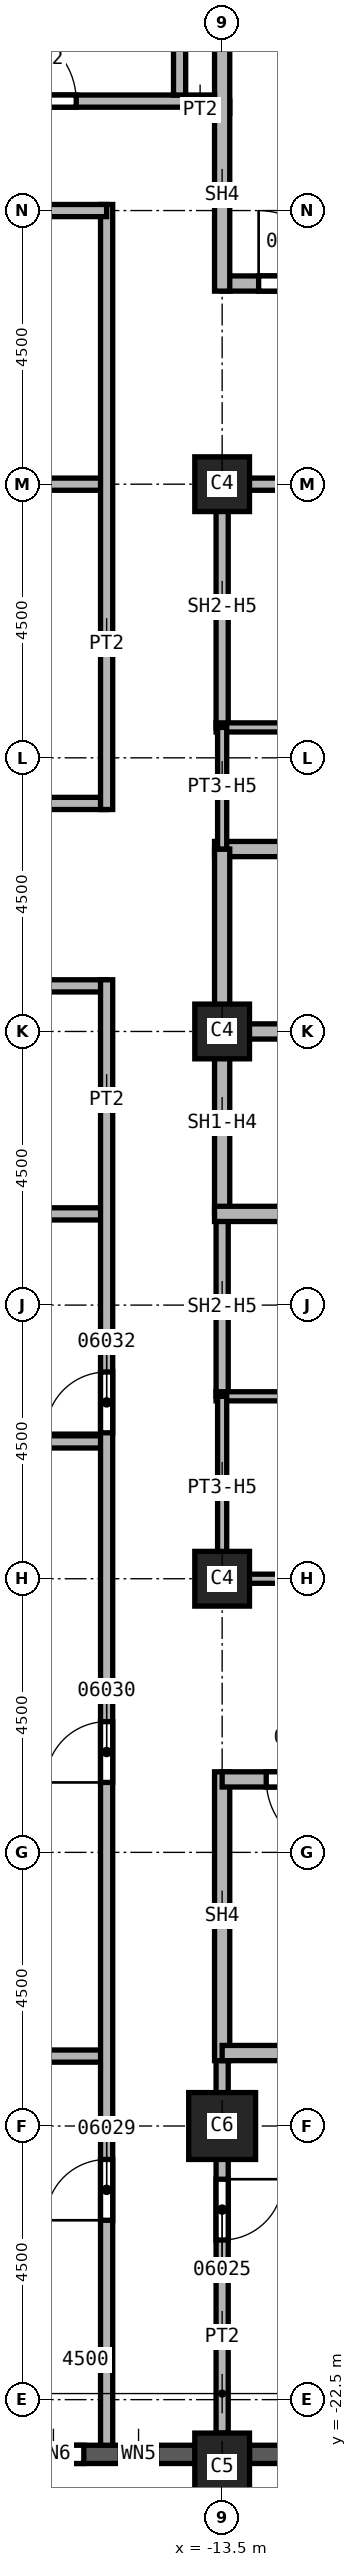
"""IFC4 building model, lengths in metres.
Left out: names, types, materials, properties, quantities, classifications, styles, units other than length and angle.
Written with IfcOpenShell. Run it as: python <this file> out.ifc"""

import sys

from ifc_helpers import new_model, si_unit, direction, frame, frame_2d, origin, origin_2d, place, context, subcontext, project, spatial, rectangle, extrude, element, fill, save


model = new_model("IFC4")
c1 = context("Model", 3, precision=1e-05, world=origin(), true_north=direction((0.0, 1.0)))
c2 = subcontext(c1, "Body", "Model", "MODEL_VIEW")
j1 = project(units=[si_unit("LENGTHUNIT", "METRE"), si_unit("PLANEANGLEUNIT", "RADIAN")], contexts=[c1])
p1 = place(None, origin())
s1 = spatial("IfcSite", under=j1, at=p1, CompositionType="ELEMENT")
p2 = place(p1, origin())
s2 = spatial("IfcBuilding", under=s1, at=p2, CompositionType="ELEMENT")
p3 = place(p2, frame((0.0, 0.0, 130.0)))
s3 = spatial("IfcBuildingStorey", under=s2, at=p3, CompositionType="ELEMENT", Elevation=130.0)
p4 = place(p3, frame((-13.5, -18.0, 0.0), z_axis=(0.0, 0.0, 1.0), x_axis=(1.0, 0.0, 0.0)))
e1 = element("IfcColumn", 1, at=p4, inside=s3, PredefinedType="COLUMN", context=c2, shape_type="SweptSolid", body=[
    extrude(rectangle(XDim=1.1, YDim=1.1, at=origin_2d()), origin(), (0.0, 0.0, 1.0), 3.7),
])
for number, where, z_axis, x_axis in (
    (2, (-13.5, 0.0, 0.0), (0.0, 0.0, 1.0), (1.0, 0.0, 0.0)),
    (3, (-13.5, 9.0, 0.0), (0.0, 0.0, 1.0), (1.0, 0.0, 0.0)),
    (4, (-13.5, -9.0, 0.0), (0.0, 0.0, 1.0), (1.0, 0.0, 0.0)),
):
    element("IfcColumn", number, at=place(p3, frame(where, z_axis=z_axis, x_axis=x_axis)), inside=s3, PredefinedType="COLUMN", context=c2, shape_type="SweptSolid", body=[
        extrude(rectangle(XDim=0.9, YDim=0.9, at=origin_2d()), origin(), (0.0, 0.0, 1.0), 3.7),
    ])
p5 = place(p3, frame((-13.5, -23.6, 0.0), z_axis=(0.0, 0.0, 1.0), x_axis=(1.0, 0.0, 0.0)))
e5 = element("IfcColumn", 5, at=p5, inside=s3, PredefinedType="COLUMN", context=c2, shape_type="SweptSolid", body=[
    extrude(rectangle(XDim=0.9, YDim=1.1, at=origin_2d()), origin(), (0.0, 0.0, 1.0), 3.7),
])
p6 = place(p3, frame((-17.55, -23.4, 0.0), z_axis=(0.0, 0.0, 1.0), x_axis=(1.0, 0.0, 0.0)))
e6 = element("IfcWall", 6, at=p6, inside=s3, PredefinedType="SOLIDWALL", context=c2, shape_type="SweptSolid", body=[
    extrude(rectangle(XDim=3.6, YDim=0.3, at=frame_2d((1.8, 0.0))), origin(), (0.0, 0.0, 1.0), 3.1),
])
p7 = place(p6, frame((0.775, 0.0, 0.8)))
e7 = element("IfcOpeningElement", 7, at=p7, cuts=e6, PredefinedType="OPENING", context=c2, shape_type="SweptSolid", body=[
    extrude(rectangle(XDim=1.0, YDim=1.95, at=frame_2d((0.5, 0.975))), frame((0.0, 0.15, 0.0), z_axis=(0.0, -1.0, 0.0), x_axis=(1.0, 0.0, 0.0)), (0.0, 0.0, 1.0), 0.3),
])
p8 = place(p6, frame((2.375, 0.0, 0.8)))
e8 = element("IfcOpeningElement", 8, at=p8, cuts=e6, PredefinedType="OPENING", context=c2, shape_type="SweptSolid", body=[
    extrude(rectangle(XDim=0.6, YDim=1.95, at=frame_2d((0.3, 0.975))), frame((0.0, 0.15, 0.0), z_axis=(0.0, -1.0, 0.0), x_axis=(1.0, 0.0, 0.0)), (0.0, 0.0, 1.0), 0.3),
])
p9 = place(p3, frame((-13.05, -23.4, 0.0), z_axis=(0.0, 0.0, 1.0), x_axis=(1.0, 0.0, 0.0)))
e9 = element("IfcWall", 9, at=p9, inside=s3, PredefinedType="SOLIDWALL", context=c2, shape_type="SweptSolid", body=[
    extrude(rectangle(XDim=3.6, YDim=0.3, at=frame_2d((1.8, 0.0))), origin(), (0.0, 0.0, 1.0), 3.1),
])
p10 = place(p9, frame((0.6, 0.0, 0.8)))
e10 = element("IfcOpeningElement", 10, at=p10, cuts=e9, PredefinedType="OPENING", context=c2, shape_type="SweptSolid", body=[
    extrude(rectangle(XDim=2.4, YDim=1.95, at=frame_2d((1.2, 0.975))), frame((0.0, 0.15, 0.0), z_axis=(0.0, -1.0, 0.0), x_axis=(1.0, 0.0, 0.0)), (0.0, 0.0, 1.0), 0.3),
])
p11 = place(p3, frame((-33.85, 3.75, 0.0), z_axis=(0.0, 0.0, 1.0), x_axis=(1.0, 0.0, 0.0)))
e11 = element("IfcWall", 11, at=p11, inside=s3, PredefinedType="PARTITIONING", context=c2, shape_type="SweptSolid", body=[
    extrude(rectangle(XDim=18.45, YDim=0.2, at=frame_2d((9.225, 0.0))), origin(), (0.0, 0.0, 1.0), 3.7),
])
p12 = place(p11, frame((14.8, 0.0, 0.0)))
e12 = element("IfcOpeningElement", 12, at=p12, cuts=e11, PredefinedType="OPENING", context=c2, shape_type="SweptSolid", body=[
    extrude(rectangle(XDim=1.0, YDim=2.1, at=frame_2d((0.5, 1.05))), frame((0.0, 0.1, 0.0), z_axis=(0.0, -1.0, 0.0), x_axis=(1.0, 0.0, 0.0)), (0.0, 0.0, 1.0), 0.2),
])
p13 = place(p3, frame((-15.4, 0.75, 0.0), z_axis=(0.0, 0.0, 1.0), x_axis=(-1.0, 0.0, 0.0)))
e13 = element("IfcWall", 13, at=p13, inside=s3, PredefinedType="PARTITIONING", context=c2, shape_type="SweptSolid", body=[
    extrude(rectangle(XDim=18.45, YDim=0.2, at=frame_2d((9.225, 0.0))), origin(), (0.0, 0.0, 1.0), 3.7),
])
p14 = place(p13, frame((2.65, 0.0, 0.0)))
e14 = element("IfcOpeningElement", 14, at=p14, cuts=e13, PredefinedType="OPENING", context=c2, shape_type="SweptSolid", body=[
    extrude(rectangle(XDim=1.0, YDim=2.1, at=frame_2d((0.5, 1.05))), frame((0.0, 0.1, 0.0), z_axis=(0.0, -1.0, 0.0), x_axis=(1.0, 0.0, 0.0)), (0.0, 0.0, 1.0), 0.2),
])
p15 = place(p13, frame((12.5, 0.0, 0.0)))
e15 = element("IfcOpeningElement", 15, at=p15, cuts=e13, PredefinedType="OPENING", context=c2, shape_type="SweptSolid", body=[
    extrude(rectangle(XDim=1.0, YDim=2.1, at=frame_2d((0.5, 1.05))), frame((0.0, 0.1, 0.0), z_axis=(0.0, -1.0, 0.0), x_axis=(1.0, 0.0, 0.0)), (0.0, 0.0, 1.0), 0.2),
])
for number, where, z_axis, x_axis in (
    (16, (-27.1, -6.75, 0.0), (0.0, 0.0, 1.0), (1.0, 0.0, 0.0)),
    (17, (-27.1, -3.0, 0.0), (0.0, 0.0, 1.0), (1.0, 0.0, 0.0)),
    (18, (-27.1, 9.0, 0.0), (0.0, 0.0, 1.0), (1.0, 0.0, 0.0)),
):
    element("IfcWall", number, at=place(p3, frame(where, z_axis=z_axis, x_axis=x_axis)), inside=s3, PredefinedType="PARTITIONING", context=c2, shape_type="SweptSolid", body=[
        extrude(rectangle(XDim=11.7, YDim=0.2, at=frame_2d((5.85, 0.0))), origin(), (0.0, 0.0, 1.0), 3.7),
    ])
p16 = place(p3, frame((-20.0, -16.85, 0.0), z_axis=(0.0, 0.0, 1.0), x_axis=(1.0, 0.0, 0.0)))
e19 = element("IfcWall", 19, at=p16, inside=s3, PredefinedType="PARTITIONING", context=c2, shape_type="SweptSolid", body=[
    extrude(rectangle(XDim=4.6, YDim=0.2, at=frame_2d((2.3, 0.0))), origin(), (0.0, 0.0, 1.0), 3.7),
])
p17 = place(p3, frame((-15.4, -23.25, 0.0), z_axis=(0.0, 0.0, 1.0), x_axis=(0.0, 1.0, 0.0)))
e20 = element("IfcWall", 20, at=p17, inside=s3, PredefinedType="PARTITIONING", context=c2, shape_type="SweptSolid", body=[
    extrude(rectangle(XDim=24.1, YDim=0.2, at=frame_2d((12.05, 0.0))), origin(), (0.0, 0.0, 1.0), 3.7),
])
p18 = place(p17, frame((3.7, 0.0, 0.0)))
e21 = element("IfcOpeningElement", 21, at=p18, cuts=e20, PredefinedType="OPENING", context=c2, shape_type="SweptSolid", body=[
    extrude(rectangle(XDim=1.0, YDim=2.1, at=frame_2d((0.5, 1.05))), frame((0.0, 0.1, 0.0), z_axis=(0.0, -1.0, 0.0), x_axis=(1.0, 0.0, 0.0)), (0.0, 0.0, 1.0), 0.2),
])
p19 = place(p17, frame((10.9, 0.0, 0.0)))
e22 = element("IfcOpeningElement", 22, at=p19, cuts=e20, PredefinedType="OPENING", context=c2, shape_type="SweptSolid", body=[
    extrude(rectangle(XDim=1.0, YDim=2.1, at=frame_2d((0.5, 1.05))), frame((0.0, 0.1, 0.0), z_axis=(0.0, -1.0, 0.0), x_axis=(1.0, 0.0, 0.0)), (0.0, 0.0, 1.0), 0.2),
])
p20 = place(p17, frame((16.65, 0.0, 0.0)))
e23 = element("IfcOpeningElement", 23, at=p20, cuts=e20, PredefinedType="OPENING", context=c2, shape_type="SweptSolid", body=[
    extrude(rectangle(XDim=1.0, YDim=2.1, at=frame_2d((0.5, 1.05))), frame((0.0, 0.1, 0.0), z_axis=(0.0, -1.0, 0.0), x_axis=(1.0, 0.0, 0.0)), (0.0, 0.0, 1.0), 0.2),
])
p21 = place(p3, frame((-15.4, 3.65, 0.0), z_axis=(0.0, 0.0, 1.0), x_axis=(0.0, 1.0, 0.0)))
e24 = element("IfcWall", 24, at=p21, inside=s3, PredefinedType="PARTITIONING", context=c2, shape_type="SweptSolid", body=[
    extrude(rectangle(XDim=9.95, YDim=0.2, at=frame_2d((4.975, 0.0))), origin(), (0.0, 0.0, 1.0), 3.7),
])
p22 = place(p3, frame((-15.4, 13.5, 0.0), z_axis=(0.0, 0.0, 1.0), x_axis=(-1.0, 0.0, 0.0)))
e25 = element("IfcWall", 25, at=p22, inside=s3, PredefinedType="PARTITIONING", context=c2, shape_type="SweptSolid", body=[
    extrude(rectangle(XDim=6.6, YDim=0.2, at=frame_2d((3.3, 0.0))), origin(), (0.0, 0.0, 1.0), 3.7),
])
p23 = place(p22, frame((4.6, 0.0, 0.0)))
e26 = element("IfcOpeningElement", 26, at=p23, cuts=e25, PredefinedType="OPENING", context=c2, shape_type="SweptSolid", body=[
    extrude(rectangle(XDim=1.0, YDim=2.1, at=frame_2d((0.5, 1.05))), frame((0.0, 0.1, 0.0), z_axis=(0.0, -1.0, 0.0), x_axis=(1.0, 0.0, 0.0)), (0.0, 0.0, 1.0), 0.2),
])
p24 = place(p3, frame((-14.1, 15.2, 0.0), z_axis=(0.0, 0.0, 1.0), x_axis=(1.0, 0.0, 0.0)))
e27 = element("IfcWall", 27, at=p24, inside=s3, PredefinedType="PARTITIONING", context=c2, shape_type="SweptSolid", body=[
    extrude(rectangle(XDim=0.725, YDim=0.2, at=frame_2d((0.363, 0.0))), origin(), (0.0, 0.0, 1.0), 3.7),
])
p25 = place(p3, frame((-13.5, -16.675, 0.0), z_axis=(0.0, 0.0, 1.0), x_axis=(0.0, -1.0, 0.0)))
e28 = element("IfcWall", 28, at=p25, inside=s3, PredefinedType="PARTITIONING", context=c2, shape_type="SweptSolid", body=[
    extrude(rectangle(XDim=6.375, YDim=0.2, at=frame_2d((3.188, 0.0))), origin(), (0.0, 0.0, 1.0), 3.7),
])
p26 = place(p25, frame((2.2, 0.0, 0.0)))
e29 = element("IfcOpeningElement", 29, at=p26, cuts=e28, PredefinedType="OPENING", context=c2, shape_type="SweptSolid", body=[
    extrude(rectangle(XDim=1.0, YDim=2.1, at=frame_2d((0.5, 1.05))), frame((0.0, 0.1, 0.0), z_axis=(0.0, -1.0, 0.0), x_axis=(1.0, 0.0, 0.0)), (0.0, 0.0, 1.0), 0.2),
])
p27 = place(p3, frame((-13.5, -6.0, 0.0), z_axis=(0.0, 0.0, 1.0), x_axis=(0.0, 1.0, 0.0)))
e30 = element("IfcWall", 30, at=p27, inside=s3, PredefinedType="SOLIDWALL", context=c2, shape_type="SweptSolid", body=[
    extrude(rectangle(XDim=3.0, YDim=0.2, at=frame_2d((1.5, 0.0))), origin(), (0.0, 0.0, 1.0), 2.938),
])
p28 = place(p3, frame((-13.5, 5.0, 0.0), z_axis=(0.0, 0.0, 1.0), x_axis=(0.0, 1.0, 0.0)))
e31 = element("IfcWall", 31, at=p28, inside=s3, PredefinedType="SOLIDWALL", context=c2, shape_type="SweptSolid", body=[
    extrude(rectangle(XDim=4.1, YDim=0.2, at=frame_2d((2.05, 0.0))), origin(), (0.0, 0.0, 1.0), 2.938),
])
p29 = place(p3, frame((-13.5, 9.0, 0.0), z_axis=(0.0, 0.0, 1.0), x_axis=(1.0, 0.0, 0.0)))
e32 = element("IfcWall", 32, at=p29, inside=s3, PredefinedType="SOLIDWALL", context=c2, shape_type="SweptSolid", body=[
    extrude(rectangle(XDim=3.0, YDim=0.2, at=frame_2d((1.5, 0.0))), origin(), (0.0, 0.0, 1.0), 2.938),
])
p30 = place(p3, frame((-13.625, 0.0, 0.0), z_axis=(0.0, 0.0, 1.0), x_axis=(1.0, 0.0, 0.0)))
e33 = element("IfcWall", 33, at=p30, inside=s3, PredefinedType="SOLIDWALL", context=c2, shape_type="SweptSolid", body=[
    extrude(rectangle(XDim=3.125, YDim=0.25, at=frame_2d((1.562, 0.0))), origin(), (0.0, 0.0, 1.0), 3.7),
])
p31 = place(p3, frame((-13.625, 3.0, 0.0), z_axis=(0.0, 0.0, 1.0), x_axis=(1.0, 0.0, 0.0)))
e34 = element("IfcWall", 34, at=p31, inside=s3, PredefinedType="SOLIDWALL", context=c2, shape_type="SweptSolid", body=[
    extrude(rectangle(XDim=6.125, YDim=0.25, at=frame_2d((3.062, 0.0))), origin(), (0.0, 0.0, 1.0), 3.7),
])
p32 = place(p31, frame((3.25, 0.0, 0.0)))
e35 = element("IfcOpeningElement", 35, at=p32, cuts=e34, PredefinedType="OPENING", context=c2, shape_type="SweptSolid", body=[
    extrude(rectangle(XDim=1.1, YDim=2.1, at=frame_2d((0.55, 1.05))), frame((0.0, 0.125, 0.0), z_axis=(0.0, -1.0, 0.0), x_axis=(1.0, 0.0, 0.0)), (0.0, 0.0, 1.0), 0.25),
])
p33 = place(p3, frame((-13.5, -3.0, 0.0), z_axis=(0.0, 0.0, 1.0), x_axis=(0.0, 1.0, 0.0)))
e36 = element("IfcWall", 36, at=p33, inside=s3, PredefinedType="SOLIDWALL", context=c2, shape_type="SweptSolid", body=[
    extrude(rectangle(XDim=6.0, YDim=0.25, at=frame_2d((3.0, 0.0))), origin(), (0.0, 0.0, 1.0), 2.938),
])
p34 = place(p3, frame((-13.625, -3.0, 0.0), z_axis=(0.0, 0.0, 1.0), x_axis=(1.0, 0.0, 0.0)))
e37 = element("IfcWall", 37, at=p34, inside=s3, PredefinedType="SOLIDWALL", context=c2, shape_type="SweptSolid", body=[
    extrude(rectangle(XDim=9.25, YDim=0.25, at=frame_2d((4.625, 0.0))), origin(), (0.0, 0.0, 1.0), 3.7),
])
p35 = place(p34, frame((3.25, 0.0, 0.0)))
e38 = element("IfcOpeningElement", 38, at=p35, cuts=e37, PredefinedType="OPENING", context=c2, shape_type="SweptSolid", body=[
    extrude(rectangle(XDim=1.1, YDim=2.1, at=frame_2d((0.55, 1.05))), frame((0.0, 0.125, 0.0), z_axis=(0.0, -1.0, 0.0), x_axis=(1.0, 0.0, 0.0)), (0.0, 0.0, 1.0), 0.25),
])
p36 = place(p3, frame((-13.5, -12.175, 0.0), z_axis=(0.0, 0.0, 1.0), x_axis=(0.0, -1.0, 0.0)))
e39 = element("IfcWall", 39, at=p36, inside=s3, PredefinedType="SOLIDWALL", context=c2, shape_type="SweptSolid", body=[
    extrude(rectangle(XDim=4.75, YDim=0.25, at=frame_2d((2.375, 0.0))), origin(), (0.0, 0.0, 1.0), 3.7),
])
p37 = place(p3, frame((-13.5, 12.3, 0.0), z_axis=(0.0, 0.0, 1.0), x_axis=(1.0, 0.0, 0.0)))
e40 = element("IfcWall", 40, at=p37, inside=s3, PredefinedType="SOLIDWALL", context=c2, shape_type="SweptSolid", body=[
    extrude(rectangle(XDim=9.125, YDim=0.25, at=frame_2d((4.562, 0.0))), origin(), (0.0, 0.0, 1.0), 3.7),
])
p38 = place(p37, frame((0.6, 0.0, 0.0)))
e41 = element("IfcOpeningElement", 41, at=p38, cuts=e40, PredefinedType="OPENING", context=c2, shape_type="SweptSolid", body=[
    extrude(rectangle(XDim=1.2, YDim=2.1, at=frame_2d((0.6, 1.05))), frame((0.0, 0.125, 0.0), z_axis=(0.0, -1.0, 0.0), x_axis=(1.0, 0.0, 0.0)), (0.0, 0.0, 1.0), 0.25),
])
p39 = place(p3, frame((-13.5, 12.175, 0.0), z_axis=(0.0, 0.0, 1.0), x_axis=(0.0, 1.0, 0.0)))
e42 = element("IfcWall", 42, at=p39, inside=s3, PredefinedType="SOLIDWALL", context=c2, shape_type="SweptSolid", body=[
    extrude(rectangle(XDim=4.75, YDim=0.25, at=frame_2d((2.375, 0.0))), origin(), (0.0, 0.0, 1.0), 3.7),
])
p40 = place(p3, frame((-4.5, -16.8, 0.0), z_axis=(0.0, 0.0, 1.0), x_axis=(-1.0, 0.0, 0.0)))
e43 = element("IfcWall", 43, at=p40, inside=s3, PredefinedType="SOLIDWALL", context=c2, shape_type="SweptSolid", body=[
    extrude(rectangle(XDim=9.0, YDim=0.25, at=frame_2d((4.5, 0.0))), origin(), (0.0, 0.0, 1.0), 3.7),
])
p41 = place(p3, frame((-4.375, -12.3, 0.0), z_axis=(0.0, 0.0, 1.0), x_axis=(-1.0, 0.0, 0.0)))
e44 = element("IfcWall", 44, at=p41, inside=s3, PredefinedType="SOLIDWALL", context=c2, shape_type="SweptSolid", body=[
    extrude(rectangle(XDim=9.125, YDim=0.25, at=frame_2d((4.562, 0.0))), origin(), (0.0, 0.0, 1.0), 3.7),
])
p42 = place(p41, frame((7.2, 0.0, 0.0)))
e45 = element("IfcOpeningElement", 45, at=p42, cuts=e44, PredefinedType="OPENING", context=c2, shape_type="SweptSolid", body=[
    extrude(rectangle(XDim=1.2, YDim=2.1, at=frame_2d((0.6, 1.05))), frame((0.0, 0.125, 0.0), z_axis=(0.0, -1.0, 0.0), x_axis=(1.0, 0.0, 0.0)), (0.0, 0.0, 1.0), 0.25),
])
for number, where, z_axis, x_axis in (
    (46, (-13.6, -6.0, 0.0), (0.0, 0.0, 1.0), (1.0, 0.0, 0.0)),
    (47, (-13.6, 5.0, 0.0), (0.0, 0.0, 1.0), (1.0, 0.0, 0.0)),
):
    element("IfcWall", number, at=place(p3, frame(where, z_axis=z_axis, x_axis=x_axis)), inside=s3, PredefinedType="PARTITIONING", context=c2, shape_type="SweptSolid", body=[
        extrude(rectangle(XDim=3.1, YDim=0.15, at=frame_2d((1.55, 0.0))), origin(), (0.0, 0.0, 1.0), 3.7),
    ])
p43 = place(p3, frame((-13.5, -9.075, 0.0), z_axis=(0.0, 0.0, 1.0), x_axis=(0.0, 1.0, 0.0)))
e48 = element("IfcWall", 48, at=p43, inside=s3, PredefinedType="PARTITIONING", context=c2, shape_type="SweptSolid", body=[
    extrude(rectangle(XDim=3.075, YDim=0.15, at=frame_2d((1.538, 0.0))), origin(), (0.0, 0.0, 1.0), 2.938),
])
p44 = place(p3, frame((-13.5, 3.0, 0.0), z_axis=(0.0, 0.0, 1.0), x_axis=(0.0, 1.0, 0.0)))
e49 = element("IfcWall", 49, at=p44, inside=s3, PredefinedType="PARTITIONING", context=c2, shape_type="SweptSolid", body=[
    extrude(rectangle(XDim=2.0, YDim=0.15, at=frame_2d((1.0, 0.0))), origin(), (0.0, 0.0, 1.0), 2.938),
])
p45 = place(p3, frame((-10.5, -9.0, 0.0), z_axis=(0.0, 0.0, 1.0), x_axis=(-1.0, 0.0, 0.0)))
e50 = element("IfcWall", 50, at=p45, inside=s3, PredefinedType="PARTITIONING", context=c2, shape_type="SweptSolid", body=[
    extrude(rectangle(XDim=3.0, YDim=0.15, at=frame_2d((1.5, 0.0))), origin(), (0.0, 0.0, 1.0), 2.938),
])
p46 = place(p3, frame((-21.9, 15.3, 0.0), z_axis=(0.0, 0.0, 1.0), x_axis=(1.0, 0.0, 0.0)))
e51 = element("IfcWall", 51, at=p46, inside=s3, PredefinedType="SOLIDWALL", context=c2, shape_type="SweptSolid", body=[
    extrude(rectangle(XDim=8.275, YDim=0.2, at=frame_2d((4.137, 0.0))), origin(), (0.0, 0.0, 1.0), 3.7),
])
p47 = place(p46, frame((4.8, 0.0, 0.0)))
e52 = element("IfcOpeningElement", 52, at=p47, cuts=e51, PredefinedType="OPENING", context=c2, shape_type="SweptSolid", body=[
    extrude(rectangle(XDim=1.2, YDim=2.1, at=frame_2d((0.6, 1.05))), frame((0.0, 0.1, 0.0), z_axis=(0.0, -1.0, 0.0), x_axis=(1.0, 0.0, 0.0)), (0.0, 0.0, 1.0), 0.2),
])
p48 = place(p3, frame((-14.2, 15.4, 0.0), z_axis=(0.0, 0.0, 1.0), x_axis=(0.0, 1.0, 0.0)))
e53 = element("IfcWall", 53, at=p48, inside=s3, PredefinedType="SOLIDWALL", context=c2, shape_type="SweptSolid", body=[
    extrude(rectangle(XDim=5.9, YDim=0.2, at=frame_2d((2.95, 0.0))), origin(), (0.0, 0.0, 1.0), 3.7),
])
p49 = place(p38, origin())
e54 = element("IfcDoor", 54, at=p49, inside=s3, OperationType="SINGLE_SWING_RIGHT", PredefinedType="DOOR", context=c2, shape_type="SweptSolid", body=[
    extrude(rectangle(XDim=1.2, YDim=2.1, at=frame_2d((0.6, 1.05))), frame((0.0, 0.025, 0.0), z_axis=(0.0, -1.0, 0.0), x_axis=(1.0, 0.0, 0.0)), (0.0, 0.0, 1.0), 0.05),
])
fill(e41, e54)
p50 = place(p42, origin())
e55 = element("IfcDoor", 55, at=p50, inside=s3, OperationType="SINGLE_SWING_LEFT", PredefinedType="DOOR", context=c2, shape_type="SweptSolid", body=[
    extrude(rectangle(XDim=1.2, YDim=2.1, at=frame_2d((0.6, 1.05))), frame((0.0, 0.025, 0.0), z_axis=(0.0, -1.0, 0.0), x_axis=(1.0, 0.0, 0.0)), (0.0, 0.0, 1.0), 0.05),
])
fill(e45, e55)
p51 = place(p26, origin())
e56 = element("IfcDoor", 56, at=p51, inside=s3, OperationType="SINGLE_SWING_RIGHT", PredefinedType="DOOR", context=c2, shape_type="SweptSolid", body=[
    extrude(rectangle(XDim=1.0, YDim=2.1, at=frame_2d((0.5, 1.05))), frame((0.0, 0.025, 0.0), z_axis=(0.0, -1.0, 0.0), x_axis=(1.0, 0.0, 0.0)), (0.0, 0.0, 1.0), 0.05),
])
fill(e29, e56)
p52 = place(p18, origin())
e57 = element("IfcDoor", 57, at=p52, inside=s3, OperationType="SINGLE_SWING_RIGHT", PredefinedType="DOOR", context=c2, shape_type="SweptSolid", body=[
    extrude(rectangle(XDim=1.0, YDim=2.1, at=frame_2d((0.5, 1.05))), frame((0.0, 0.025, 0.0), z_axis=(0.0, -1.0, 0.0), x_axis=(1.0, 0.0, 0.0)), (0.0, 0.0, 1.0), 0.05),
])
fill(e21, e57)
p53 = place(p19, origin())
e58 = element("IfcDoor", 58, at=p53, inside=s3, OperationType="SINGLE_SWING_LEFT", PredefinedType="DOOR", context=c2, shape_type="SweptSolid", body=[
    extrude(rectangle(XDim=1.0, YDim=2.1, at=frame_2d((0.5, 1.05))), frame((0.0, 0.025, 0.0), z_axis=(0.0, -1.0, 0.0), x_axis=(1.0, 0.0, 0.0)), (0.0, 0.0, 1.0), 0.05),
])
fill(e22, e58)
p54 = place(p20, origin())
e59 = element("IfcDoor", 59, at=p54, inside=s3, OperationType="SINGLE_SWING_LEFT", PredefinedType="DOOR", context=c2, shape_type="SweptSolid", body=[
    extrude(rectangle(XDim=1.0, YDim=2.1, at=frame_2d((0.5, 1.05))), frame((0.0, 0.025, 0.0), z_axis=(0.0, -1.0, 0.0), x_axis=(1.0, 0.0, 0.0)), (0.0, 0.0, 1.0), 0.05),
])
fill(e23, e59)
p55 = place(p47, origin())
e60 = element("IfcDoor", 60, at=p55, inside=s3, OperationType="SINGLE_SWING_RIGHT", PredefinedType="DOOR", context=c2, shape_type="SweptSolid", body=[
    extrude(rectangle(XDim=1.2, YDim=2.1, at=frame_2d((0.6, 1.05))), frame((0.0, 0.025, 0.0), z_axis=(0.0, -1.0, 0.0), x_axis=(1.0, 0.0, 0.0)), (0.0, 0.0, 1.0), 0.05),
])
fill(e52, e60)
p56 = place(p7, origin())
e61 = element("IfcWindow", 61, at=p56, inside=s3, PartitioningType="SINGLE_PANEL", PredefinedType="WINDOW", context=c2, shape_type="SweptSolid", body=[
    extrude(rectangle(XDim=1.0, YDim=1.95, at=frame_2d((0.5, 0.975))), frame((0.0, 0.03, 0.0), z_axis=(0.0, -1.0, 0.0), x_axis=(1.0, 0.0, 0.0)), (0.0, 0.0, 1.0), 0.06),
])
fill(e7, e61)
p57 = place(p8, origin())
e62 = element("IfcWindow", 62, at=p57, inside=s3, PartitioningType="SINGLE_PANEL", PredefinedType="WINDOW", context=c2, shape_type="SweptSolid", body=[
    extrude(rectangle(XDim=0.6, YDim=1.95, at=frame_2d((0.3, 0.975))), frame((0.0, 0.03, 0.0), z_axis=(0.0, -1.0, 0.0), x_axis=(1.0, 0.0, 0.0)), (0.0, 0.0, 1.0), 0.06),
])
fill(e8, e62)
save(model, sys.argv[1])
